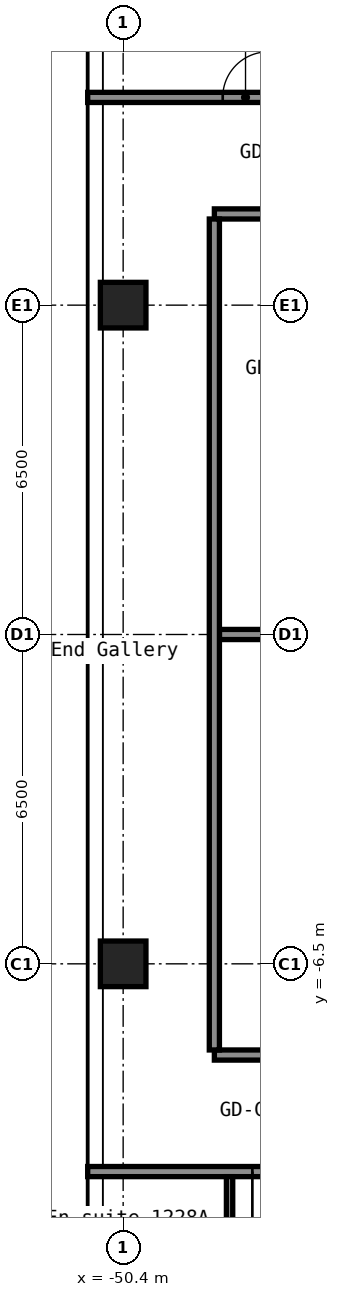
"""IFC4 building model, lengths in metres.
Left out: names, types, materials, properties, quantities, classifications, styles, units other than length and angle.
Written with IfcOpenShell. Run it as: python <this file> out.ifc"""

import sys

from ifc_helpers import new_model, si_unit, direction, frame, frame_2d, origin, origin_2d, place, context, subcontext, project, spatial, rectangle, hollow_rectangle, extrude, element, fill, save


model = new_model("IFC4")
c1 = context("Model", 3, precision=1e-05, world=origin(), true_north=direction((0.0, 1.0)))
c2 = subcontext(c1, "Body", "Model", "MODEL_VIEW")
j1 = project(units=[si_unit("LENGTHUNIT", "METRE"), si_unit("PLANEANGLEUNIT", "RADIAN")], contexts=[c1])
p1 = place(None, origin())
s1 = spatial("IfcSite", under=j1, at=p1, CompositionType="ELEMENT")
p2 = place(p1, origin())
s2 = spatial("IfcBuilding", under=s1, at=p2, CompositionType="ELEMENT")
p3 = place(p2, frame((0.0, 0.0, 45.4)))
s3 = spatial("IfcBuildingStorey", under=s2, at=p3, CompositionType="ELEMENT", Elevation=45.4)
for number, where, z_axis, x_axis in (
    (1, (-50.4, -6.5, 0.0), (0.0, 0.0, 1.0), (1.0, 0.0, 0.0)),
    (2, (-50.4, 6.5, 0.0), (0.0, 0.0, 1.0), (1.0, 0.0, 0.0)),
):
    element("IfcColumn", number, at=place(p3, frame(where, z_axis=z_axis, x_axis=x_axis)), inside=s3, PredefinedType="COLUMN", context=c2, shape_type="SweptSolid", body=[
        extrude(hollow_rectangle(XDim=0.9, YDim=0.9, WallThickness=0.036, at=origin_2d()), origin(), (0.0, 0.0, 1.0), 2.8),
    ])
p4 = place(p3, frame((-51.1, -10.6, 0.0), z_axis=(0.0, 0.0, 1.0), x_axis=(1.0, 0.0, 0.0)))
e3 = element("IfcWall", 3, at=p4, inside=s3, PredefinedType="PARTITIONING", context=c2, shape_type="SweptSolid", body=[
    extrude(rectangle(XDim=34.3, YDim=0.2, at=frame_2d((17.15, 0.0))), origin(), (0.0, 0.0, 1.0), 2.8),
])
p5 = place(p4, frame((3.25, 0.0, 0.0)))
e4 = element("IfcOpeningElement", 4, at=p5, cuts=e3, PredefinedType="OPENING", context=c2, shape_type="SweptSolid", body=[
    extrude(rectangle(XDim=1.0, YDim=2.1, at=frame_2d((0.5, 1.05))), frame((0.0, 0.11, 0.0), z_axis=(0.0, -1.0, 0.0), x_axis=(1.0, 0.0, 0.0)), (0.0, 0.0, 1.0), 0.22),
])
p6 = place(p4, frame((5.15, 0.0, 0.0)))
e5 = element("IfcOpeningElement", 5, at=p6, cuts=e3, PredefinedType="OPENING", context=c2, shape_type="SweptSolid", body=[
    extrude(rectangle(XDim=1.0, YDim=2.1, at=frame_2d((0.5, 1.05))), frame((0.0, 0.11, 0.0), z_axis=(0.0, -1.0, 0.0), x_axis=(1.0, 0.0, 0.0)), (0.0, 0.0, 1.0), 0.22),
])
p7 = place(p4, frame((14.5, 0.0, 0.0)))
e6 = element("IfcOpeningElement", 6, at=p7, cuts=e3, PredefinedType="OPENING", context=c2, shape_type="SweptSolid", body=[
    extrude(rectangle(XDim=1.0, YDim=2.1, at=frame_2d((0.5, 1.05))), frame((0.0, 0.11, 0.0), z_axis=(0.0, -1.0, 0.0), x_axis=(1.0, 0.0, 0.0)), (0.0, 0.0, 1.0), 0.22),
])
p8 = place(p4, frame((20.35, 0.0, 0.0)))
e7 = element("IfcOpeningElement", 7, at=p8, cuts=e3, PredefinedType="OPENING", context=c2, shape_type="SweptSolid", body=[
    extrude(rectangle(XDim=1.0, YDim=2.1, at=frame_2d((0.5, 1.05))), frame((0.0, 0.11, 0.0), z_axis=(0.0, -1.0, 0.0), x_axis=(1.0, 0.0, 0.0)), (0.0, 0.0, 1.0), 0.22),
])
p9 = place(p4, frame((22.05, 0.0, 0.0)))
e8 = element("IfcOpeningElement", 8, at=p9, cuts=e3, PredefinedType="OPENING", context=c2, shape_type="SweptSolid", body=[
    extrude(rectangle(XDim=1.0, YDim=2.1, at=frame_2d((0.5, 1.05))), frame((0.0, 0.11, 0.0), z_axis=(0.0, -1.0, 0.0), x_axis=(1.0, 0.0, 0.0)), (0.0, 0.0, 1.0), 0.22),
])
p10 = place(p4, frame((27.9, 0.0, 0.0)))
e9 = element("IfcOpeningElement", 9, at=p10, cuts=e3, PredefinedType="OPENING", context=c2, shape_type="SweptSolid", body=[
    extrude(rectangle(XDim=1.0, YDim=2.1, at=frame_2d((0.5, 1.05))), frame((0.0, 0.11, 0.0), z_axis=(0.0, -1.0, 0.0), x_axis=(1.0, 0.0, 0.0)), (0.0, 0.0, 1.0), 0.22),
])
p11 = place(p3, frame((-48.6, -8.3, 0.0), z_axis=(0.0, 0.0, 1.0), x_axis=(1.0, 0.0, 0.0)))
e10 = element("IfcWall", 10, at=p11, inside=s3, PredefinedType="PARTITIONING", context=c2, shape_type="SweptSolid", body=[
    extrude(rectangle(XDim=15.0, YDim=0.2, at=frame_2d((7.5, 0.0))), origin(), (0.0, 0.0, 1.0), 2.8),
])
p12 = place(p11, frame((3.85, 0.0, 0.0)))
e11 = element("IfcOpeningElement", 11, at=p12, cuts=e10, PredefinedType="OPENING", context=c2, shape_type="SweptSolid", body=[
    extrude(rectangle(XDim=1.6, YDim=2.1, at=frame_2d((0.8, 1.05))), frame((0.0, 0.11, 0.0), z_axis=(0.0, -1.0, 0.0), x_axis=(1.0, 0.0, 0.0)), (0.0, 0.0, 1.0), 0.22),
])
p13 = place(p3, frame((-48.5, 0.0, 0.0), z_axis=(0.0, 0.0, 1.0), x_axis=(1.0, 0.0, 0.0)))
e12 = element("IfcWall", 12, at=p13, inside=s3, PredefinedType="PARTITIONING", context=c2, shape_type="SweptSolid", body=[
    extrude(rectangle(XDim=14.9, YDim=0.2, at=frame_2d((7.45, 0.0))), origin(), (0.0, 0.0, 1.0), 2.8),
])
p14 = place(p3, frame((-48.6, 8.3, 0.0), z_axis=(0.0, 0.0, 1.0), x_axis=(1.0, 0.0, 0.0)))
e13 = element("IfcWall", 13, at=p14, inside=s3, PredefinedType="PARTITIONING", context=c2, shape_type="SweptSolid", body=[
    extrude(rectangle(XDim=15.0, YDim=0.2, at=frame_2d((7.5, 0.0))), origin(), (0.0, 0.0, 1.0), 2.8),
])
p15 = place(p14, frame((1.15, 0.0, 0.0)))
e14 = element("IfcOpeningElement", 14, at=p15, cuts=e13, PredefinedType="OPENING", context=c2, shape_type="SweptSolid", body=[
    extrude(rectangle(XDim=1.0, YDim=2.1, at=frame_2d((0.5, 1.05))), frame((0.0, 0.11, 0.0), z_axis=(0.0, -1.0, 0.0), x_axis=(1.0, 0.0, 0.0)), (0.0, 0.0, 1.0), 0.22),
])
p16 = place(p14, frame((12.0, 0.0, 0.0)))
e15 = element("IfcOpeningElement", 15, at=p16, cuts=e13, PredefinedType="OPENING", context=c2, shape_type="SweptSolid", body=[
    extrude(rectangle(XDim=1.0, YDim=2.1, at=frame_2d((0.5, 1.05))), frame((0.0, 0.11, 0.0), z_axis=(0.0, -1.0, 0.0), x_axis=(1.0, 0.0, 0.0)), (0.0, 0.0, 1.0), 0.22),
])
p17 = place(p3, frame((-51.1, 10.6, 0.0), z_axis=(0.0, 0.0, 1.0), x_axis=(1.0, 0.0, 0.0)))
e16 = element("IfcWall", 16, at=p17, inside=s3, PredefinedType="PARTITIONING", context=c2, shape_type="SweptSolid", body=[
    extrude(rectangle(XDim=34.3, YDim=0.2, at=frame_2d((17.15, 0.0))), origin(), (0.0, 0.0, 1.0), 2.8),
])
p18 = place(p17, frame((2.665, 0.0, 0.0)))
e17 = element("IfcOpeningElement", 17, at=p18, cuts=e16, PredefinedType="OPENING", context=c2, shape_type="SweptSolid", body=[
    extrude(rectangle(XDim=0.9, YDim=2.1, at=frame_2d((0.45, 1.05))), frame((0.0, 0.11, 0.0), z_axis=(0.0, -1.0, 0.0), x_axis=(1.0, 0.0, 0.0)), (0.0, 0.0, 1.0), 0.22),
])
p19 = place(p17, frame((7.065, 0.0, 0.0)))
e18 = element("IfcOpeningElement", 18, at=p19, cuts=e16, PredefinedType="OPENING", context=c2, shape_type="SweptSolid", body=[
    extrude(rectangle(XDim=0.9, YDim=2.1, at=frame_2d((0.45, 1.05))), frame((0.0, 0.11, 0.0), z_axis=(0.0, -1.0, 0.0), x_axis=(1.0, 0.0, 0.0)), (0.0, 0.0, 1.0), 0.22),
])
p20 = place(p17, frame((12.8, 0.0, 0.0)))
e19 = element("IfcOpeningElement", 19, at=p20, cuts=e16, PredefinedType="OPENING", context=c2, shape_type="SweptSolid", body=[
    extrude(rectangle(XDim=1.0, YDim=2.1, at=frame_2d((0.5, 1.05))), frame((0.0, 0.11, 0.0), z_axis=(0.0, -1.0, 0.0), x_axis=(1.0, 0.0, 0.0)), (0.0, 0.0, 1.0), 0.22),
])
p21 = place(p17, frame((18.56, 0.0, 0.0)))
e20 = element("IfcOpeningElement", 20, at=p21, cuts=e16, PredefinedType="OPENING", context=c2, shape_type="SweptSolid", body=[
    extrude(rectangle(XDim=0.9, YDim=2.1, at=frame_2d((0.45, 1.05))), frame((0.0, 0.11, 0.0), z_axis=(0.0, -1.0, 0.0), x_axis=(1.0, 0.0, 0.0)), (0.0, 0.0, 1.0), 0.22),
])
p22 = place(p17, frame((22.76, 0.0, 0.0)))
e21 = element("IfcOpeningElement", 21, at=p22, cuts=e16, PredefinedType="OPENING", context=c2, shape_type="SweptSolid", body=[
    extrude(rectangle(XDim=0.9, YDim=2.1, at=frame_2d((0.45, 1.05))), frame((0.0, 0.11, 0.0), z_axis=(0.0, -1.0, 0.0), x_axis=(1.0, 0.0, 0.0)), (0.0, 0.0, 1.0), 0.22),
])
p23 = place(p17, frame((27.045, 0.0, 0.0)))
e22 = element("IfcOpeningElement", 22, at=p23, cuts=e16, PredefinedType="OPENING", context=c2, shape_type="SweptSolid", body=[
    extrude(rectangle(XDim=0.9, YDim=2.1, at=frame_2d((0.45, 1.05))), frame((0.0, 0.11, 0.0), z_axis=(0.0, -1.0, 0.0), x_axis=(1.0, 0.0, 0.0)), (0.0, 0.0, 1.0), 0.22),
])
p24 = place(p17, frame((31.245, 0.0, 0.0)))
e23 = element("IfcOpeningElement", 23, at=p24, cuts=e16, PredefinedType="OPENING", context=c2, shape_type="SweptSolid", body=[
    extrude(rectangle(XDim=0.9, YDim=2.1, at=frame_2d((0.45, 1.05))), frame((0.0, 0.11, 0.0), z_axis=(0.0, -1.0, 0.0), x_axis=(1.0, 0.0, 0.0)), (0.0, 0.0, 1.0), 0.22),
])
p25 = place(p3, frame((-48.6, -8.2, 0.0), z_axis=(0.0, 0.0, 1.0), x_axis=(0.0, 1.0, 0.0)))
e24 = element("IfcWall", 24, at=p25, inside=s3, PredefinedType="PARTITIONING", context=c2, shape_type="SweptSolid", body=[
    extrude(rectangle(XDim=16.4, YDim=0.2, at=frame_2d((8.2, 0.0))), origin(), (0.0, 0.0, 1.0), 2.8),
])
p26 = place(p3, frame((-48.3, -13.6, 0.0), z_axis=(0.0, 0.0, 1.0), x_axis=(0.0, 1.0, 0.0)))
e25 = element("IfcWall", 25, at=p26, inside=s3, PredefinedType="PARTITIONING", context=c2, shape_type="SweptSolid", body=[
    extrude(rectangle(XDim=2.9, YDim=0.125, at=frame_2d((1.45, 0.0))), origin(), (0.0, 0.0, 1.0), 2.8),
])
p27 = place(p26, frame((0.6, 0.0, 0.0)))
e26 = element("IfcOpeningElement", 26, at=p27, cuts=e25, PredefinedType="OPENING", context=c2, shape_type="SweptSolid", body=[
    extrude(rectangle(XDim=0.8, YDim=2.1, at=frame_2d((0.4, 1.05))), frame((0.0, 0.073, 0.0), z_axis=(0.0, -1.0, 0.0), x_axis=(1.0, 0.0, 0.0)), (0.0, 0.0, 1.0), 0.145),
])
p28 = place(p5, origin())
e27 = element("IfcDoor", 27, at=p28, inside=s3, OperationType="SINGLE_SWING_LEFT", PredefinedType="DOOR", context=c2, shape_type="SweptSolid", body=[
    extrude(rectangle(XDim=1.0, YDim=2.1, at=frame_2d((0.5, 1.05))), frame((0.0, 0.025, 0.0), z_axis=(0.0, -1.0, 0.0), x_axis=(1.0, 0.0, 0.0)), (0.0, 0.0, 1.0), 0.05),
])
fill(e4, e27)
p29 = place(p18, origin())
e28 = element("IfcDoor", 28, at=p29, inside=s3, OperationType="SINGLE_SWING_LEFT", PredefinedType="DOOR", context=c2, shape_type="SweptSolid", body=[
    extrude(rectangle(XDim=0.9, YDim=2.1, at=frame_2d((0.45, 1.05))), frame((0.0, 0.025, 0.0), z_axis=(0.0, -1.0, 0.0), x_axis=(1.0, 0.0, 0.0)), (0.0, 0.0, 1.0), 0.05),
])
fill(e17, e28)
save(model, sys.argv[1])
